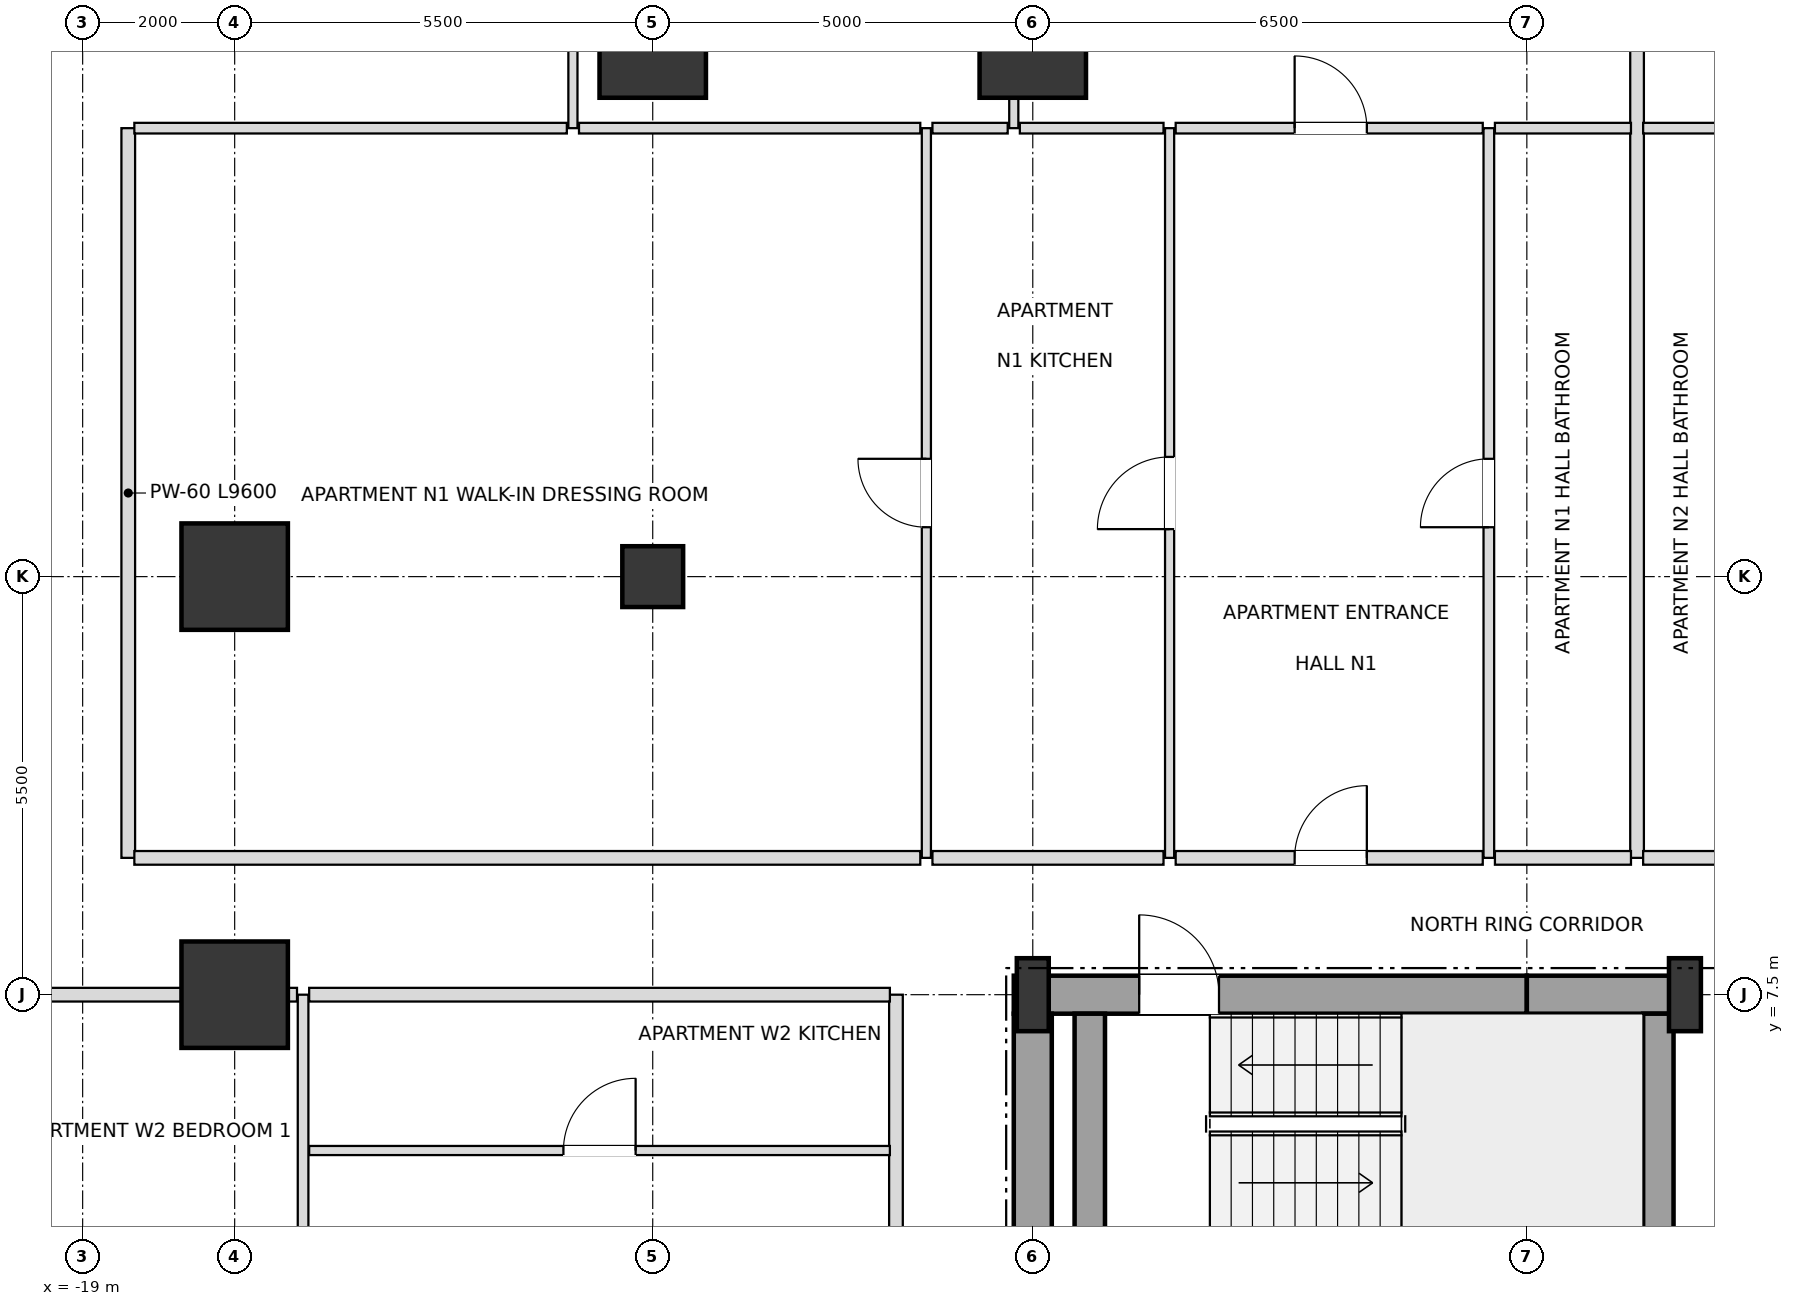
"""IFC4 building model, lengths in metres.
Left out: names, types, materials, properties, quantities, classifications, styles, units other than length and angle.
Written with IfcOpenShell. Run it as: python <this file> out.ifc"""

import sys

from ifc_helpers import new_model, si_unit, direction, frame, frame_2d, origin, origin_2d, place, context, subcontext, project, spatial, rectangle, i_section, extrude, element, fill, save


model = new_model("IFC4")
c1 = context("Model", 3, precision=1e-05, world=origin(), true_north=direction((0.0, 1.0)))
c2 = subcontext(c1, "Body", "Model", "MODEL_VIEW")
j1 = project(units=[si_unit("LENGTHUNIT", "METRE"), si_unit("PLANEANGLEUNIT", "RADIAN")], contexts=[c1])
p1 = place(None, origin())
s1 = spatial("IfcSite", under=j1, at=p1, CompositionType="ELEMENT")
p2 = place(p1, origin())
s2 = spatial("IfcBuilding", under=s1, at=p2, CompositionType="ELEMENT")
p3 = place(p2, frame((0.0, 0.0, 32.4)))
s3 = spatial("IfcBuildingStorey", under=s2, at=p3, CompositionType="ELEMENT", Elevation=32.4)
for number, where, z_axis, x_axis in (
    (1, (-6.5, 7.5, 0.0), (0.0, 0.0, 1.0), (1.0, 0.0, 0.0)),
    (2, (2.08, 7.5, 0.0), (0.0, 0.0, 1.0), (1.0, 0.0, 0.0)),
):
    element("IfcColumn", number, at=place(p3, frame(where, z_axis=z_axis, x_axis=x_axis)), inside=s3, PredefinedType="COLUMN", context=c2, shape_type="SweptSolid", body=[
        extrude(i_section(OverallWidth=0.42, OverallDepth=0.96, WebThickness=0.022, FlangeThickness=0.034, at=origin_2d()), origin(), (0.0, 0.0, 1.0), 3.6),
    ])
for number, where, z_axis, x_axis in (
    (3, (-6.5, 20.0, 0.0), (0.0, 0.0, 1.0), (1.0, 0.0, 0.0)),
    (4, (-11.5, 20.0, 0.0), (0.0, 0.0, 1.0), (1.0, 0.0, 0.0)),
    (5, (-17.0, 13.0, 0.0), (0.0, 0.0, 1.0), (1.0, 0.0, 0.0)),
    (6, (-17.0, 7.5, 0.0), (0.0, 0.0, 1.0), (1.0, 0.0, 0.0)),
):
    element("IfcColumn", number, at=place(p3, frame(where, z_axis=z_axis, x_axis=x_axis)), inside=s3, PredefinedType="USERDEFINED", context=c2, shape_type="SweptSolid", body=[
        extrude(rectangle(XDim=1.4, YDim=1.4, at=origin_2d()), origin(), (0.0, 0.0, 1.0), 3.6),
    ])
p4 = place(p3, frame((-11.5, 13.0, 0.0), z_axis=(0.0, 0.0, 1.0), x_axis=(1.0, 0.0, 0.0)))
e7 = element("IfcColumn", 7, at=p4, inside=s3, PredefinedType="COLUMN", context=c2, shape_type="SweptSolid", body=[
    extrude(rectangle(XDim=0.8, YDim=0.8, at=origin_2d()), origin(), (0.0, 0.0, 1.0), 3.6),
])
p5 = place(p3, frame((-6.75, 7.5, 0.0), z_axis=(0.0, 0.0, 1.0), x_axis=(1.0, 0.0, 0.0)))
e8 = element("IfcWall", 8, at=p5, inside=s3, PredefinedType="SHEAR", context=c2, shape_type="SweptSolid", body=[
    extrude(rectangle(XDim=6.75, YDim=0.5, at=frame_2d((3.375, 0.0))), origin(), (0.0, 0.0, 1.0), 3.38),
])
p6 = place(p5, frame((1.65, 0.0, 0.0)))
e9 = element("IfcOpeningElement", 9, at=p6, cuts=e8, PredefinedType="OPENING", context=c2, shape_type="SweptSolid", body=[
    extrude(rectangle(XDim=1.05, YDim=2.15, at=frame_2d((0.525, 1.075))), frame((0.0, 0.26, 0.0), z_axis=(0.0, -1.0, 0.0), x_axis=(1.0, 0.0, 0.0)), (0.0, 0.0, 1.0), 0.52),
])
p7 = place(p3, frame((0.0, 7.5, 0.0), z_axis=(0.0, 0.0, 1.0), x_axis=(1.0, 0.0, 0.0)))
e10 = element("IfcWall", 10, at=p7, inside=s3, PredefinedType="SHEAR", context=c2, shape_type="SweptSolid", body=[
    extrude(rectangle(XDim=2.08, YDim=0.5, at=frame_2d((1.04, 0.0))), origin(), (0.0, 0.0, 1.0), 3.38),
])
p8 = place(p3, frame((-6.5, 3.95, 0.0), z_axis=(0.0, 0.0, 1.0), x_axis=(0.0, 1.0, 0.0)))
e11 = element("IfcWall", 11, at=p8, inside=s3, PredefinedType="SHEAR", context=c2, shape_type="SweptSolid", body=[
    extrude(rectangle(XDim=3.3, YDim=0.5, at=frame_2d((1.65, 0.0))), origin(), (0.0, 0.0, 1.0), 3.38),
])
for number, where, z_axis, x_axis in (
    (12, (1.73, 3.95, 0.0), (0.0, 0.0, 1.0), (0.0, 1.0, 0.0)),
    (13, (-5.75, 3.95, 0.0), (0.0, 0.0, 1.0), (0.0, 1.0, 0.0)),
):
    element("IfcWall", number, at=place(p3, frame(where, z_axis=z_axis, x_axis=x_axis)), inside=s3, PredefinedType="SHEAR", context=c2, shape_type="SweptSolid", body=[
        extrude(rectangle(XDim=3.3, YDim=0.4, at=frame_2d((1.65, 0.0))), origin(), (0.0, 0.0, 1.0), 3.38),
    ])
p9 = place(p3, frame((-18.4, 9.3, 0.0), z_axis=(0.0, 0.0, 1.0), x_axis=(0.0, 1.0, 0.0)))
e14 = element("IfcWall", 14, at=p9, inside=s3, PredefinedType="PARTITIONING", context=c2, shape_type="SweptSolid", body=[
    extrude(rectangle(XDim=9.6, YDim=0.18, at=frame_2d((4.8, 0.0))), origin(), (0.0, 0.0, 1.0), 2.736),
])
p10 = place(p3, frame((-16.1, -7.5, 0.0), z_axis=(0.0, 0.0, 1.0), x_axis=(0.0, 1.0, 0.0)))
e15 = element("IfcWall", 15, at=p10, inside=s3, PredefinedType="PARTITIONING", context=c2, shape_type="SweptSolid", body=[
    extrude(rectangle(XDim=15.0, YDim=0.14, at=frame_2d((7.5, 0.0))), origin(), (0.0, 0.0, 1.0), 3.38),
])
p11 = place(p10, frame((2.305, 0.0, 0.0)))
e16 = element("IfcOpeningElement", 16, at=p11, cuts=e15, PredefinedType="OPENING", context=c2, shape_type="SweptSolid", body=[
    extrude(rectangle(XDim=0.95, YDim=2.1, at=frame_2d((0.475, 1.05))), frame((0.0, 0.08, 0.0), z_axis=(0.0, -1.0, 0.0), x_axis=(1.0, 0.0, 0.0)), (0.0, 0.0, 1.0), 0.16),
])
p12 = place(p10, frame((9.425, 0.0, 0.0)))
e17 = element("IfcOpeningElement", 17, at=p12, cuts=e15, PredefinedType="OPENING", context=c2, shape_type="SweptSolid", body=[
    extrude(rectangle(XDim=0.95, YDim=2.1, at=frame_2d((0.475, 1.05))), frame((0.0, 0.08, 0.0), z_axis=(0.0, -1.0, 0.0), x_axis=(1.0, 0.0, 0.0)), (0.0, 0.0, 1.0), 0.16),
])
p13 = place(p3, frame((-12.55, 18.9, 0.0), z_axis=(0.0, 0.0, 1.0), x_axis=(0.0, 1.0, 0.0)))
e18 = element("IfcWall", 18, at=p13, inside=s3, PredefinedType="PARTITIONING", context=c2, shape_type="SweptSolid", body=[
    extrude(rectangle(XDim=6.0, YDim=0.12, at=frame_2d((3.0, 0.0))), origin(), (0.0, 0.0, 1.0), 2.736),
])
p14 = place(p13, frame((2.55, 0.0, 0.0)))
e19 = element("IfcOpeningElement", 19, at=p14, cuts=e18, PredefinedType="OPENING", context=c2, shape_type="SweptSolid", body=[
    extrude(rectangle(XDim=0.9, YDim=2.1, at=frame_2d((0.45, 1.05))), frame((0.0, 0.07, 0.0), z_axis=(0.0, -1.0, 0.0), x_axis=(1.0, 0.0, 0.0)), (0.0, 0.0, 1.0), 0.14),
])
p15 = place(p3, frame((-8.3, -7.5, 0.0), z_axis=(0.0, 0.0, 1.0), x_axis=(0.0, 1.0, 0.0)))
e20 = element("IfcWall", 20, at=p15, inside=s3, PredefinedType="PARTITIONING", context=c2, shape_type="SweptSolid", body=[
    extrude(rectangle(XDim=15.0, YDim=0.18, at=frame_2d((7.5, 0.0))), origin(), (0.0, 0.0, 1.0), 3.38),
])
p16 = place(p15, frame((2.965, 0.0, 0.0)))
e21 = element("IfcOpeningElement", 21, at=p16, cuts=e20, PredefinedType="OPENING", context=c2, shape_type="SweptSolid", body=[
    extrude(rectangle(XDim=0.95, YDim=2.15, at=frame_2d((0.475, 1.075))), frame((0.0, 0.1, 0.0), z_axis=(0.0, -1.0, 0.0), x_axis=(1.0, 0.0, 0.0)), (0.0, 0.0, 1.0), 0.2),
])
p17 = place(p15, frame((10.465, 0.0, 0.0)))
e22 = element("IfcOpeningElement", 22, at=p17, cuts=e20, PredefinedType="OPENING", context=c2, shape_type="SweptSolid", body=[
    extrude(rectangle(XDim=0.95, YDim=2.15, at=frame_2d((0.475, 1.075))), frame((0.0, 0.1, 0.0), z_axis=(0.0, -1.0, 0.0), x_axis=(1.0, 0.0, 0.0)), (0.0, 0.0, 1.0), 0.2),
])
p18 = place(p3, frame((-7.9, 9.3, 0.0), z_axis=(0.0, 0.0, 1.0), x_axis=(0.0, 1.0, 0.0)))
e23 = element("IfcWall", 23, at=p18, inside=s3, PredefinedType="PARTITIONING", context=c2, shape_type="SweptSolid", body=[
    extrude(rectangle(XDim=9.6, YDim=0.12, at=frame_2d((4.8, 0.0))), origin(), (0.0, 0.0, 1.0), 2.816),
])
p19 = place(p18, frame((4.35, 0.0, 0.0)))
e24 = element("IfcOpeningElement", 24, at=p19, cuts=e23, PredefinedType="OPENING", context=c2, shape_type="SweptSolid", body=[
    extrude(rectangle(XDim=0.9, YDim=2.1, at=frame_2d((0.45, 1.05))), frame((0.0, 0.07, 0.0), z_axis=(0.0, -1.0, 0.0), x_axis=(1.0, 0.0, 0.0)), (0.0, 0.0, 1.0), 0.14),
])
p20 = place(p3, frame((-6.75, 18.9, 0.0), z_axis=(0.0, 0.0, 1.0), x_axis=(0.0, 1.0, 0.0)))
e25 = element("IfcWall", 25, at=p20, inside=s3, PredefinedType="PARTITIONING", context=c2, shape_type="SweptSolid", body=[
    extrude(rectangle(XDim=6.0, YDim=0.12, at=frame_2d((3.0, 0.0))), origin(), (0.0, 0.0, 1.0), 2.816),
])
p21 = place(p20, frame((2.55, 0.0, 0.0)))
e26 = element("IfcOpeningElement", 26, at=p21, cuts=e25, PredefinedType="OPENING", context=c2, shape_type="SweptSolid", body=[
    extrude(rectangle(XDim=0.9, YDim=2.1, at=frame_2d((0.45, 1.05))), frame((0.0, 0.07, 0.0), z_axis=(0.0, -1.0, 0.0), x_axis=(1.0, 0.0, 0.0)), (0.0, 0.0, 1.0), 0.14),
])
p22 = place(p3, frame((-4.7, 9.3, 0.0), z_axis=(0.0, 0.0, 1.0), x_axis=(0.0, 1.0, 0.0)))
e27 = element("IfcWall", 27, at=p22, inside=s3, PredefinedType="PARTITIONING", context=c2, shape_type="SweptSolid", body=[
    extrude(rectangle(XDim=9.6, YDim=0.12, at=frame_2d((4.8, 0.0))), origin(), (0.0, 0.0, 1.0), 2.948),
])
p23 = place(p22, frame((4.325, 0.0, 0.0)))
e28 = element("IfcOpeningElement", 28, at=p23, cuts=e27, PredefinedType="OPENING", context=c2, shape_type="SweptSolid", body=[
    extrude(rectangle(XDim=0.95, YDim=2.1, at=frame_2d((0.475, 1.05))), frame((0.0, 0.07, 0.0), z_axis=(0.0, -1.0, 0.0), x_axis=(1.0, 0.0, 0.0)), (0.0, 0.0, 1.0), 0.14),
])
p24 = place(p3, frame((-0.5, 9.3, 0.0), z_axis=(0.0, 0.0, 1.0), x_axis=(0.0, 1.0, 0.0)))
e29 = element("IfcWall", 29, at=p24, inside=s3, PredefinedType="PARTITIONING", context=c2, shape_type="SweptSolid", body=[
    extrude(rectangle(XDim=9.6, YDim=0.14, at=frame_2d((4.8, 0.0))), origin(), (0.0, 0.0, 1.0), 2.948),
])
p25 = place(p24, frame((4.35, 0.0, 0.0)))
e30 = element("IfcOpeningElement", 30, at=p25, cuts=e29, PredefinedType="OPENING", context=c2, shape_type="SweptSolid", body=[
    extrude(rectangle(XDim=0.9, YDim=2.1, at=frame_2d((0.45, 1.05))), frame((0.0, 0.08, 0.0), z_axis=(0.0, -1.0, 0.0), x_axis=(1.0, 0.0, 0.0)), (0.0, 0.0, 1.0), 0.16),
])
p26 = place(p3, frame((1.45, 9.3, 0.0), z_axis=(0.0, 0.0, 1.0), x_axis=(0.0, 1.0, 0.0)))
e31 = element("IfcWall", 31, at=p26, inside=s3, PredefinedType="PARTITIONING", context=c2, shape_type="SweptSolid", body=[
    extrude(rectangle(XDim=15.6, YDim=0.18, at=frame_2d((7.8, 0.0))), origin(), (0.0, 0.0, 1.0), 2.816),
])
p27 = place(p3, frame((-16.02, 5.45, 0.0), z_axis=(0.0, 0.0, 1.0), x_axis=(1.0, 0.0, 0.0)))
e32 = element("IfcWall", 32, at=p27, inside=s3, PredefinedType="PARTITIONING", context=c2, shape_type="SweptSolid", body=[
    extrude(rectangle(XDim=7.64, YDim=0.12, at=frame_2d((3.82, 0.0))), origin(), (0.0, 0.0, 1.0), 2.948),
])
p28 = place(p27, frame((3.345, 0.0, 0.0)))
e33 = element("IfcOpeningElement", 33, at=p28, cuts=e32, PredefinedType="OPENING", context=c2, shape_type="SweptSolid", body=[
    extrude(rectangle(XDim=0.95, YDim=2.1, at=frame_2d((0.475, 1.05))), frame((0.0, 0.07, 0.0), z_axis=(0.0, -1.0, 0.0), x_axis=(1.0, 0.0, 0.0)), (0.0, 0.0, 1.0), 0.14),
])
p29 = place(p3, frame((-21.9, 7.5, 0.0), z_axis=(0.0, 0.0, 1.0), x_axis=(1.0, 0.0, 0.0)))
e34 = element("IfcWall", 34, at=p29, inside=s3, PredefinedType="PARTITIONING", context=c2, shape_type="SweptSolid", body=[
    extrude(rectangle(XDim=5.72, YDim=0.18, at=frame_2d((2.86, 0.0))), origin(), (0.0, 0.0, 1.0), 2.816),
])
p30 = place(p3, frame((-16.02, 7.5, 0.0), z_axis=(0.0, 0.0, 1.0), x_axis=(1.0, 0.0, 0.0)))
e35 = element("IfcWall", 35, at=p30, inside=s3, PredefinedType="PARTITIONING", context=c2, shape_type="SweptSolid", body=[
    extrude(rectangle(XDim=7.64, YDim=0.18, at=frame_2d((3.82, 0.0))), origin(), (0.0, 0.0, 1.0), 2.816),
])
p31 = place(p3, frame((-18.32, 9.3, 0.0), z_axis=(0.0, 0.0, 1.0), x_axis=(1.0, 0.0, 0.0)))
e36 = element("IfcWall", 36, at=p31, inside=s3, PredefinedType="PARTITIONING", context=c2, shape_type="SweptSolid", body=[
    extrude(rectangle(XDim=10.34, YDim=0.18, at=frame_2d((5.17, 0.0))), origin(), (0.0, 0.0, 1.0), 2.816),
])
p32 = place(p3, frame((-7.82, 9.3, 0.0), z_axis=(0.0, 0.0, 1.0), x_axis=(1.0, 0.0, 0.0)))
e37 = element("IfcWall", 37, at=p32, inside=s3, PredefinedType="PARTITIONING", context=c2, shape_type="SweptSolid", body=[
    extrude(rectangle(XDim=3.04, YDim=0.18, at=frame_2d((1.52, 0.0))), origin(), (0.0, 0.0, 1.0), 2.816),
])
p33 = place(p3, frame((-4.62, 9.3, 0.0), z_axis=(0.0, 0.0, 1.0), x_axis=(1.0, 0.0, 0.0)))
e38 = element("IfcWall", 38, at=p33, inside=s3, PredefinedType="PARTITIONING", context=c2, shape_type="SweptSolid", body=[
    extrude(rectangle(XDim=4.04, YDim=0.18, at=frame_2d((2.02, 0.0))), origin(), (0.0, 0.0, 1.0), 3.38),
])
p34 = place(p33, frame((1.565, 0.0, 0.0)))
e39 = element("IfcOpeningElement", 39, at=p34, cuts=e38, PredefinedType="OPENING", context=c2, shape_type="SweptSolid", body=[
    extrude(rectangle(XDim=0.95, YDim=2.15, at=frame_2d((0.475, 1.075))), frame((0.0, 0.1, 0.0), z_axis=(0.0, -1.0, 0.0), x_axis=(1.0, 0.0, 0.0)), (0.0, 0.0, 1.0), 0.2),
])
for number, where, z_axis, x_axis in (
    (40, (-0.42, 9.3, 0.0), (0.0, 0.0, 1.0), (1.0, 0.0, 0.0)),
    (41, (1.53, 9.3, 0.0), (0.0, 0.0, 1.0), (1.0, 0.0, 0.0)),
):
    element("IfcWall", number, at=place(p3, frame(where, z_axis=z_axis, x_axis=x_axis)), inside=s3, PredefinedType="PARTITIONING", context=c2, shape_type="SweptSolid", body=[
        extrude(rectangle(XDim=1.79, YDim=0.18, at=frame_2d((0.895, 0.0))), origin(), (0.0, 0.0, 1.0), 3.38),
    ])
p35 = place(p3, frame((-18.32, 18.9, 0.0), z_axis=(0.0, 0.0, 1.0), x_axis=(1.0, 0.0, 0.0)))
e42 = element("IfcWall", 42, at=p35, inside=s3, PredefinedType="PARTITIONING", context=c2, shape_type="SweptSolid", body=[
    extrude(rectangle(XDim=5.69, YDim=0.14, at=frame_2d((2.845, 0.0))), origin(), (0.0, 0.0, 1.0), 2.736),
])
p36 = place(p3, frame((-12.47, 18.9, 0.0), z_axis=(0.0, 0.0, 1.0), x_axis=(1.0, 0.0, 0.0)))
e43 = element("IfcWall", 43, at=p36, inside=s3, PredefinedType="PARTITIONING", context=c2, shape_type="SweptSolid", body=[
    extrude(rectangle(XDim=4.49, YDim=0.14, at=frame_2d((2.245, 0.0))), origin(), (0.0, 0.0, 1.0), 2.736),
])
p37 = place(p3, frame((-7.82, 18.9, 0.0), z_axis=(0.0, 0.0, 1.0), x_axis=(1.0, 0.0, 0.0)))
e44 = element("IfcWall", 44, at=p37, inside=s3, PredefinedType="PARTITIONING", context=c2, shape_type="SweptSolid", body=[
    extrude(rectangle(XDim=0.99, YDim=0.14, at=frame_2d((0.495, 0.0))), origin(), (0.0, 0.0, 1.0), 3.38),
])
p38 = place(p3, frame((-6.67, 18.9, 0.0), z_axis=(0.0, 0.0, 1.0), x_axis=(1.0, 0.0, 0.0)))
e45 = element("IfcWall", 45, at=p38, inside=s3, PredefinedType="PARTITIONING", context=c2, shape_type="SweptSolid", body=[
    extrude(rectangle(XDim=1.89, YDim=0.14, at=frame_2d((0.945, 0.0))), origin(), (0.0, 0.0, 1.0), 2.816),
])
p39 = place(p3, frame((-4.62, 18.9, 0.0), z_axis=(0.0, 0.0, 1.0), x_axis=(1.0, 0.0, 0.0)))
e46 = element("IfcWall", 46, at=p39, inside=s3, PredefinedType="PARTITIONING", context=c2, shape_type="SweptSolid", body=[
    extrude(rectangle(XDim=4.04, YDim=0.14, at=frame_2d((2.02, 0.0))), origin(), (0.0, 0.0, 1.0), 3.38),
])
p40 = place(p39, frame((1.565, 0.0, 0.0)))
e47 = element("IfcOpeningElement", 47, at=p40, cuts=e46, PredefinedType="OPENING", context=c2, shape_type="SweptSolid", body=[
    extrude(rectangle(XDim=0.95, YDim=2.1, at=frame_2d((0.475, 1.05))), frame((0.0, 0.08, 0.0), z_axis=(0.0, -1.0, 0.0), x_axis=(1.0, 0.0, 0.0)), (0.0, 0.0, 1.0), 0.16),
])
for number, where, z_axis, x_axis in (
    (48, (-0.42, 18.9, 0.0), (0.0, 0.0, 1.0), (1.0, 0.0, 0.0)),
    (49, (1.53, 18.9, 0.0), (0.0, 0.0, 1.0), (1.0, 0.0, 0.0)),
):
    element("IfcWall", number, at=place(p3, frame(where, z_axis=z_axis, x_axis=x_axis)), inside=s3, PredefinedType="PARTITIONING", context=c2, shape_type="SweptSolid", body=[
        extrude(rectangle(XDim=1.79, YDim=0.14, at=frame_2d((0.895, 0.0))), origin(), (0.0, 0.0, 1.0), 3.38),
    ])
p41 = place(p6, origin())
e50 = element("IfcDoor", 50, at=p41, inside=s3, OperationType="SINGLE_SWING_LEFT", PredefinedType="DOOR", context=c2, shape_type="SweptSolid", body=[
    extrude(rectangle(XDim=1.05, YDim=2.15, at=frame_2d((0.525, 1.075))), frame((0.0, 0.025, 0.0), z_axis=(0.0, -1.0, 0.0), x_axis=(1.0, 0.0, 0.0)), (0.0, 0.0, 1.0), 0.05),
])
fill(e9, e50)
p42 = place(p25, origin())
e51 = element("IfcDoor", 51, at=p42, inside=s3, OperationType="SINGLE_SWING_LEFT", PredefinedType="DOOR", context=c2, shape_type="SweptSolid", body=[
    extrude(rectangle(XDim=0.9, YDim=2.1, at=frame_2d((0.45, 1.05))), frame((0.0, 0.025, 0.0), z_axis=(0.0, -1.0, 0.0), x_axis=(1.0, 0.0, 0.0)), (0.0, 0.0, 1.0), 0.05),
])
fill(e30, e51)
p43 = place(p34, origin())
e52 = element("IfcDoor", 52, at=p43, inside=s3, OperationType="SINGLE_SWING_RIGHT", PredefinedType="DOOR", context=c2, shape_type="SweptSolid", body=[
    extrude(rectangle(XDim=0.95, YDim=2.15, at=frame_2d((0.475, 1.075))), frame((0.0, 0.025, 0.0), z_axis=(0.0, -1.0, 0.0), x_axis=(1.0, 0.0, 0.0)), (0.0, 0.0, 1.0), 0.05),
])
fill(e39, e52)
p44 = place(p23, origin())
e53 = element("IfcDoor", 53, at=p44, inside=s3, OperationType="SINGLE_SWING_LEFT", PredefinedType="DOOR", context=c2, shape_type="SweptSolid", body=[
    extrude(rectangle(XDim=0.95, YDim=2.1, at=frame_2d((0.475, 1.05))), frame((0.0, 0.025, 0.0), z_axis=(0.0, -1.0, 0.0), x_axis=(1.0, 0.0, 0.0)), (0.0, 0.0, 1.0), 0.05),
])
fill(e28, e53)
p45 = place(p19, origin())
e54 = element("IfcDoor", 54, at=p45, inside=s3, OperationType="SINGLE_SWING_RIGHT", PredefinedType="DOOR", context=c2, shape_type="SweptSolid", body=[
    extrude(rectangle(XDim=0.9, YDim=2.1, at=frame_2d((0.45, 1.05))), frame((0.0, 0.025, 0.0), z_axis=(0.0, -1.0, 0.0), x_axis=(1.0, 0.0, 0.0)), (0.0, 0.0, 1.0), 0.05),
])
fill(e24, e54)
p46 = place(p40, origin())
e55 = element("IfcDoor", 55, at=p46, inside=s3, OperationType="SINGLE_SWING_LEFT", PredefinedType="DOOR", context=c2, shape_type="SweptSolid", body=[
    extrude(rectangle(XDim=0.95, YDim=2.1, at=frame_2d((0.475, 1.05))), frame((0.0, 0.025, 0.0), z_axis=(0.0, -1.0, 0.0), x_axis=(1.0, 0.0, 0.0)), (0.0, 0.0, 1.0), 0.05),
])
fill(e47, e55)
p47 = place(p28, origin())
e56 = element("IfcDoor", 56, at=p47, inside=s3, OperationType="SINGLE_SWING_RIGHT", PredefinedType="DOOR", context=c2, shape_type="SweptSolid", body=[
    extrude(rectangle(XDim=0.95, YDim=2.1, at=frame_2d((0.475, 1.05))), frame((0.0, 0.025, 0.0), z_axis=(0.0, -1.0, 0.0), x_axis=(1.0, 0.0, 0.0)), (0.0, 0.0, 1.0), 0.05),
])
fill(e33, e56)
save(model, sys.argv[1])
